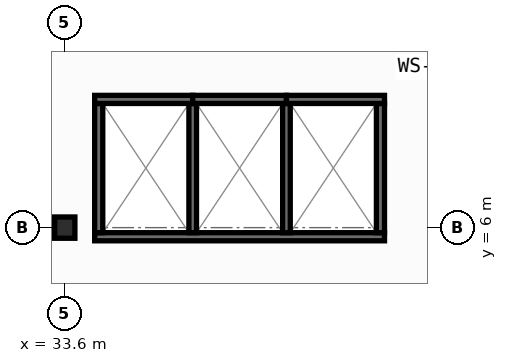
"""IFC4 building model, lengths in metres.
Left out: names, types, materials, properties, quantities, classifications, styles, units other than length and angle.
Written with IfcOpenShell. Run it as: python <this file> out.ifc"""

import sys

from ifc_helpers import new_model, si_unit, direction, frame, frame_2d, origin, origin_2d, place, context, subcontext, project, spatial, rectangle, i_section, extrude, element, save


model = new_model("IFC4")
c1 = context("Model", 3, precision=1e-05, world=origin(), true_north=direction((0.0, 1.0)))
c2 = subcontext(c1, "Body", "Model", "MODEL_VIEW")
j1 = project(units=[si_unit("LENGTHUNIT", "METRE"), si_unit("PLANEANGLEUNIT", "RADIAN")], contexts=[c1])
p1 = place(None, origin())
s1 = spatial("IfcSite", under=j1, at=p1, CompositionType="ELEMENT")
p2 = place(p1, origin())
s2 = spatial("IfcBuilding", under=s1, at=p2, CompositionType="ELEMENT")
p3 = place(p2, frame((0.0, 0.0, 18.0)))
s3 = spatial("IfcBuildingStorey", under=s2, at=p3, CompositionType="ELEMENT", Elevation=18.0)
p4 = place(p3, frame((33.6, 6.0, 0.0), z_axis=(0.0, 0.0, 1.0), x_axis=(1.0, 0.0, 0.0)))
e1 = element("IfcColumn", 1, at=p4, inside=s3, PredefinedType="COLUMN", context=c2, shape_type="SweptSolid", body=[
    extrude(i_section(OverallWidth=0.4, OverallDepth=0.42, WebThickness=0.025, FlangeThickness=0.04, at=origin_2d()), origin(), (0.0, 0.0, 1.0), 4.5),
])
p5 = place(p3, frame((34.19, 5.82, 0.0), z_axis=(0.0, 0.0, 1.0), x_axis=(1.0, 0.0, 0.0)))
e2 = element("IfcWall", 2, at=p5, inside=s3, PredefinedType="SHEAR", context=c2, shape_type="SweptSolid", body=[
    extrude(rectangle(XDim=5.72, YDim=0.16, at=frame_2d((2.86, 0.0))), origin(), (0.0, 0.0, 1.0), 4.08),
])
for number, where, z_axis, x_axis in (
    (3, (34.27, 5.9, 0.0), (0.0, 0.0, 1.0), (0.0, 1.0, 0.0)),
    (4, (39.83, 5.9, 0.0), (0.0, 0.0, 1.0), (0.0, 1.0, 0.0)),
):
    element("IfcWall", number, at=place(p3, frame(where, z_axis=z_axis, x_axis=x_axis)), inside=s3, PredefinedType="SHEAR", context=c2, shape_type="SweptSolid", body=[
        extrude(rectangle(XDim=2.55, YDim=0.16, at=frame_2d((1.275, 0.0))), origin(), (0.0, 0.0, 1.0), 4.08),
    ])
for number, where, z_axis, x_axis in (
    (5, (36.125, 5.9, 0.0), (0.0, 0.0, 1.0), (0.0, 1.0, 0.0)),
    (6, (37.975, 5.9, 0.0), (0.0, 0.0, 1.0), (0.0, 1.0, 0.0)),
):
    element("IfcWall", number, at=place(p3, frame(where, z_axis=z_axis, x_axis=x_axis)), inside=s3, PredefinedType="SHEAR", context=c2, shape_type="SweptSolid", body=[
        extrude(rectangle(XDim=2.55, YDim=0.15, at=frame_2d((1.275, 0.0))), origin(), (0.0, 0.0, 1.0), 4.08),
    ])
p6 = place(p3, frame((34.19, 8.53, 0.0), z_axis=(0.0, 0.0, 1.0), x_axis=(1.0, 0.0, 0.0)))
e7 = element("IfcWall", 7, at=p6, inside=s3, PredefinedType="SHEAR", context=c2, shape_type="SweptSolid", body=[
    extrude(rectangle(XDim=1.935, YDim=0.16, at=frame_2d((0.968, 0.0))), origin(), (0.0, 0.0, 1.0), 4.08),
])
p7 = place(p3, frame((36.125, 8.53, 0.0), z_axis=(0.0, 0.0, 1.0), x_axis=(1.0, 0.0, 0.0)))
e8 = element("IfcWall", 8, at=p7, inside=s3, PredefinedType="SHEAR", context=c2, shape_type="SweptSolid", body=[
    extrude(rectangle(XDim=1.85, YDim=0.16, at=frame_2d((0.925, 0.0))), origin(), (0.0, 0.0, 1.0), 4.08),
])
p8 = place(p3, frame((37.975, 8.53, 0.0), z_axis=(0.0, 0.0, 1.0), x_axis=(1.0, 0.0, 0.0)))
e9 = element("IfcWall", 9, at=p8, inside=s3, PredefinedType="SHEAR", context=c2, shape_type="SweptSolid", body=[
    extrude(rectangle(XDim=1.935, YDim=0.16, at=frame_2d((0.967, 0.0))), origin(), (0.0, 0.0, 1.0), 4.08),
])
save(model, sys.argv[1])
